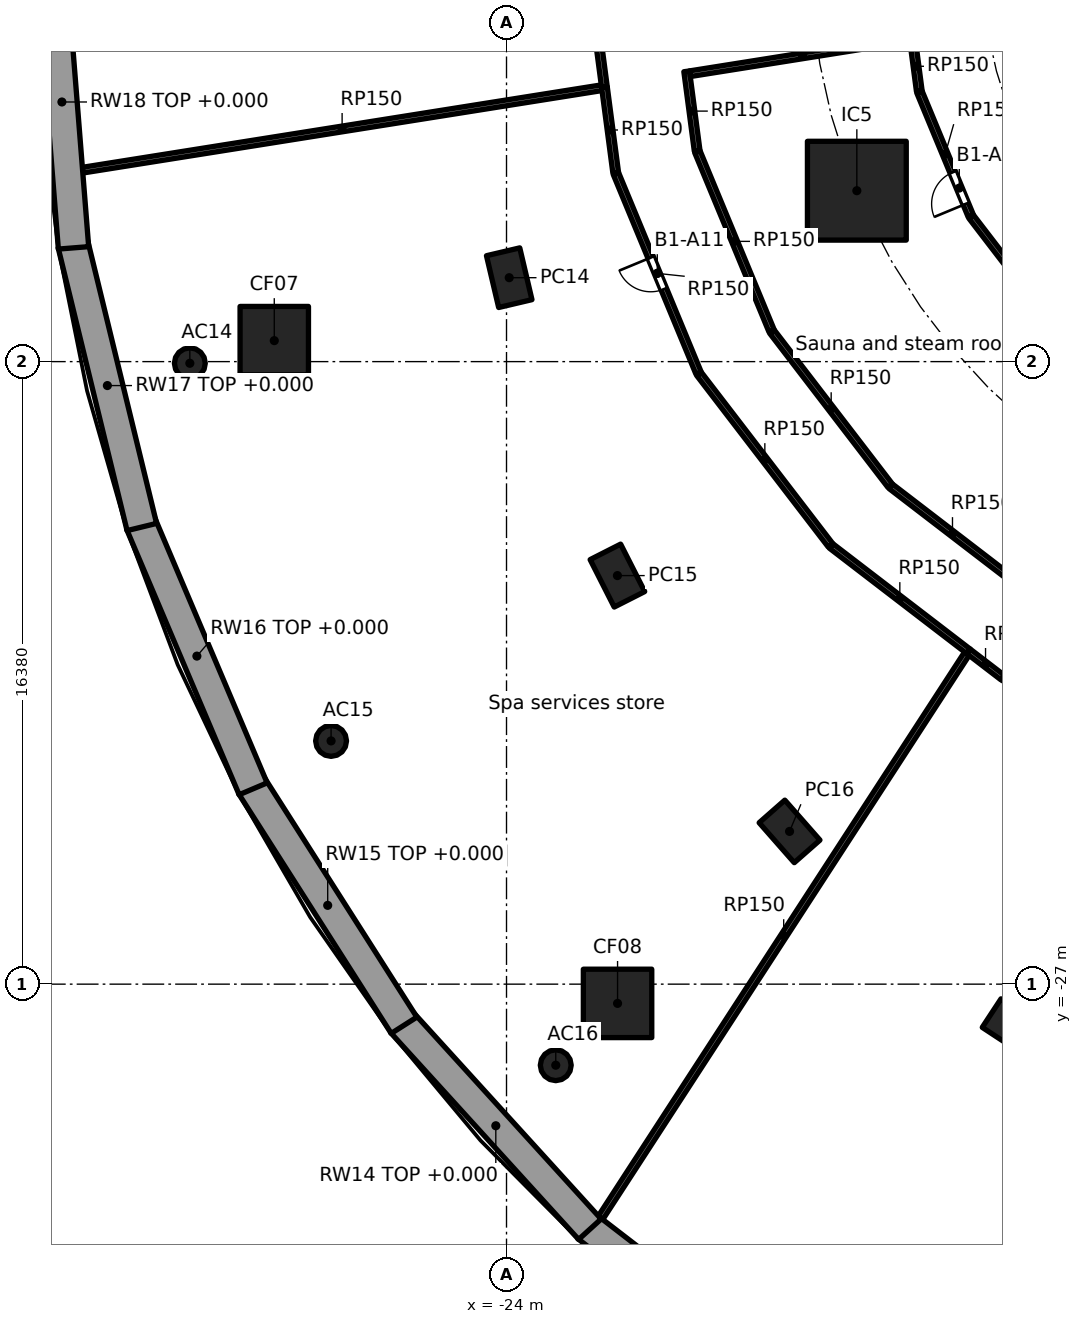
"""IFC4 building model, lengths in metres.
Left out: names, types, materials, properties, quantities, classifications, styles, units other than length and angle.
Written with IfcOpenShell. Run it as: python <this file> out.ifc"""

import sys

from ifc_helpers import new_model, si_unit, direction, frame, frame_2d, origin, origin_2d, place, context, subcontext, project, spatial, rectangle, hollow_rectangle, hollow_circle, extrude, element, fill, save


model = new_model("IFC4")
c1 = context("Model", 3, precision=1e-05, world=origin(), true_north=direction((0.0, 1.0)))
c2 = subcontext(c1, "Body", "Model", "MODEL_VIEW")
j1 = project(units=[si_unit("LENGTHUNIT", "METRE"), si_unit("PLANEANGLEUNIT", "RADIAN")], contexts=[c1])
p1 = place(None, origin())
s1 = spatial("IfcSite", under=j1, at=p1, CompositionType="ELEMENT")
p2 = place(p1, origin())
s2 = spatial("IfcBuilding", under=s1, at=p2, CompositionType="ELEMENT")
p3 = place(p2, frame((0.0, 0.0, -5.0)))
s3 = spatial("IfcBuildingStorey", under=s2, at=p3, CompositionType="ELEMENT", Elevation=-5.0)
p4 = place(p3, frame((-16.146, -37.798, 0.0), z_axis=(0.0, 0.0, 1.0), x_axis=(-0.792235092298, 0.610215993343, 0.0)))
e1 = element("IfcWall", 1, at=p4, inside=s3, PredefinedType="SOLIDWALL", context=c2, shape_type="SweptSolid", body=[
    extrude(rectangle(XDim=7.238, YDim=0.8, at=frame_2d((3.619, 0.0))), origin(), (0.0, 0.0, 1.0), 5.0),
])
p5 = place(p3, frame((-21.806, -33.449, 0.0), z_axis=(0.0, 0.0, 1.0), x_axis=(-0.672652980875, 0.73995808484, 0.0)))
e2 = element("IfcWall", 2, at=p5, inside=s3, PredefinedType="SOLIDWALL", context=c2, shape_type="SweptSolid", body=[
    extrude(rectangle(XDim=7.36, YDim=0.8, at=frame_2d((3.68, 0.0))), origin(), (0.0, 0.0, 1.0), 5.0),
])
p6 = place(p3, frame((-26.697, -28.082, 0.0), z_axis=(0.0, 0.0, 1.0), x_axis=(-0.53698952756, 0.843588908943, 0.0)))
e3 = element("IfcWall", 3, at=p6, inside=s3, PredefinedType="SOLIDWALL", context=c2, shape_type="SweptSolid", body=[
    extrude(rectangle(XDim=7.48, YDim=0.8, at=frame_2d((3.74, 0.0))), origin(), (0.0, 0.0, 1.0), 5.0),
])
p7 = place(p3, frame((-30.667, -21.86, 0.0), z_axis=(0.0, 0.0, 1.0), x_axis=(-0.390299354435, 0.920688011179, 0.0)))
e4 = element("IfcWall", 4, at=p7, inside=s3, PredefinedType="SOLIDWALL", context=c2, shape_type="SweptSolid", body=[
    extrude(rectangle(XDim=7.584, YDim=0.8, at=frame_2d((3.792, 0.0))), origin(), (0.0, 0.0, 1.0), 5.0),
])
p8 = place(p3, frame((-33.596, -14.972, 0.0), z_axis=(0.0, 0.0, 1.0), x_axis=(-0.23668985803, 0.971585256735, 0.0)))
e5 = element("IfcWall", 5, at=p8, inside=s3, PredefinedType="SOLIDWALL", context=c2, shape_type="SweptSolid", body=[
    extrude(rectangle(XDim=7.661, YDim=0.8, at=frame_2d((3.831, 0.0))), origin(), (0.0, 0.0, 1.0), 5.0),
])
p9 = place(p3, frame((-35.393, -7.627, 0.0), z_axis=(0.0, 0.0, 1.0), x_axis=(-0.079287821658, 0.996851764977, 0.0)))
e6 = element("IfcWall", 6, at=p9, inside=s3, PredefinedType="SOLIDWALL", context=c2, shape_type="SweptSolid", body=[
    extrude(rectangle(XDim=7.701, YDim=0.8, at=frame_2d((3.851, 0.0))), origin(), (0.0, 0.0, 1.0), 5.0),
])
for number, where, z_axis, x_axis in (
    (7, (-23.929, -8.412, 0.0), (0.0, 0.0, 1.0), (0.229, -0.973, 0.0)),
    (8, (-21.082, -16.25, 0.0), (0.0, 0.0, 1.0), (0.452, -0.892, 0.0)),
    (9, (-16.552, -22.981, 0.0), (0.0, 0.0, 1.0), (0.66, -0.751, 0.0)),
    (10, (-10.65, -28.146, 0.0), (0.0, 0.0, 1.0), (0.836, -0.549, 0.0)),
):
    element("IfcColumn", number, at=place(p3, frame(where, z_axis=z_axis, x_axis=x_axis)), inside=s3, PredefinedType="COLUMN", context=c2, shape_type="SweptSolid", body=[
        extrude(hollow_rectangle(XDim=1.4, YDim=0.9, WallThickness=0.05, at=origin_2d()), origin(), (0.0, 0.0, 1.0), 5.0),
    ])
p10 = place(p3, frame((-14.782, -6.123, 0.0), z_axis=(0.0, 0.0, 1.0), x_axis=(1.0, 0.0, 0.0)))
e11 = element("IfcColumn", 11, at=p10, inside=s3, PredefinedType="COLUMN", context=c2, shape_type="SweptSolid", body=[
    extrude(rectangle(XDim=2.6, YDim=2.6, at=origin_2d()), origin(), (0.0, 0.0, 1.0), 5.0),
])
for number, where, z_axis, x_axis in (
    (12, (-32.333, -10.663, 0.0), (0.0, 0.0, 1.0), (1.0, 0.0, 0.0)),
    (13, (-28.616, -20.6, 0.0), (0.0, 0.0, 1.0), (1.0, 0.0, 0.0)),
    (14, (-22.704, -29.133, 0.0), (0.0, 0.0, 1.0), (1.0, 0.0, 0.0)),
):
    element("IfcColumn", number, at=place(p3, frame(where, z_axis=z_axis, x_axis=x_axis)), inside=s3, PredefinedType="COLUMN", context=c2, shape_type="SweptSolid", body=[
        extrude(hollow_circle(Radius=0.406, WallThickness=0.025, at=origin_2d()), origin(), (0.0, 0.0, 1.0), 5.0),
    ])
for number, where, z_axis, x_axis in (
    (15, (-30.111, -10.068, 0.0), (0.0, 0.0, 1.0), (1.0, 0.0, 0.0)),
    (16, (-21.078, -27.506, 0.0), (0.0, 0.0, 1.0), (1.0, 0.0, 0.0)),
):
    element("IfcColumn", number, at=place(p3, frame(where, z_axis=z_axis, x_axis=x_axis)), inside=s3, PredefinedType="COLUMN", context=c2, shape_type="SweptSolid", body=[
        extrude(rectangle(XDim=1.8, YDim=1.8, at=origin_2d()), origin(), (0.0, 0.0, 1.0), 5.0),
    ])
p11 = place(p3, frame((-21.497, -3.414, 0.0), z_axis=(0.0, 0.0, 1.0), x_axis=(-0.987622855612, -0.156847362339, 0.0)))
e17 = element("IfcWall", 17, at=p11, inside=s3, PredefinedType="PARTITIONING", context=c2, shape_type="SweptSolid", body=[
    extrude(rectangle(XDim=13.828, YDim=0.15, at=frame_2d((6.914, 0.0))), origin(), (0.0, 0.0, 1.0), 4.6),
])
p12 = place(p3, frame((-21.423, -3.402, 0.0), z_axis=(0.0, 0.0, 1.0), x_axis=(-0.130508069965, 0.991447247045, 0.0)))
e18 = element("IfcWall", 18, at=p12, inside=s3, PredefinedType="PARTITIONING", context=c2, shape_type="SweptSolid", body=[
    extrude(rectangle(XDim=3.42, YDim=0.15, at=frame_2d((1.71, 0.0))), origin(), (0.0, 0.0, 1.0), 4.6),
])
p13 = place(p3, frame((-21.127, -5.649, 0.0), z_axis=(0.0, 0.0, 1.0), x_axis=(-0.130568768581, 0.991439255159, 0.0)))
e19 = element("IfcWall", 19, at=p13, inside=s3, PredefinedType="PARTITIONING", context=c2, shape_type="SweptSolid", body=[
    extrude(rectangle(XDim=2.266, YDim=0.15, at=frame_2d((1.133, 0.0))), origin(), (0.0, 0.0, 1.0), 4.6),
])
p14 = place(p3, frame((-19.259, -2.982, 0.0), z_axis=(0.0, 0.0, 1.0), x_axis=(0.130625106848, -0.991431833996, 0.0)))
e20 = element("IfcWall", 20, at=p14, inside=s3, PredefinedType="PARTITIONING", context=c2, shape_type="SweptSolid", body=[
    extrude(rectangle(XDim=2.11, YDim=0.15, at=frame_2d((1.055, 0.0))), origin(), (0.0, 0.0, 1.0), 4.6),
])
p15 = place(p3, frame((-18.978, -5.097, 0.0), z_axis=(0.0, 0.0, 1.0), x_axis=(0.382672704618, -0.923883976017, 0.0)))
e21 = element("IfcWall", 21, at=p15, inside=s3, PredefinedType="PARTITIONING", context=c2, shape_type="SweptSolid", body=[
    extrude(rectangle(XDim=5.106, YDim=0.15, at=frame_2d((2.553, 0.0))), origin(), (0.0, 0.0, 1.0), 4.6),
])
p16 = place(p3, frame((-18.945, -10.924, 0.0), z_axis=(0.0, 0.0, 1.0), x_axis=(-0.38269058712, 0.923876568882, 0.0)))
e22 = element("IfcWall", 22, at=p16, inside=s3, PredefinedType="PARTITIONING", context=c2, shape_type="SweptSolid", body=[
    extrude(rectangle(XDim=5.686, YDim=0.15, at=frame_2d((2.843, 0.0))), origin(), (0.0, 0.0, 1.0), 4.6),
])
p17 = place(p16, frame((2.393, 0.0, 0.0)))
e23 = element("IfcOpeningElement", 23, at=p17, cuts=e22, PredefinedType="OPENING", context=c2, shape_type="SweptSolid", body=[
    extrude(rectangle(XDim=0.9, YDim=2.1, at=frame_2d((0.45, 1.05))), frame((0.0, 0.085, 0.0), z_axis=(0.0, -1.0, 0.0), x_axis=(1.0, 0.0, 0.0)), (0.0, 0.0, 1.0), 0.17),
])
p18 = place(p3, frame((-17.012, -9.835, 0.0), z_axis=(0.0, 0.0, 1.0), x_axis=(0.608760705644, -0.793353895348, 0.0)))
e24 = element("IfcWall", 24, at=p18, inside=s3, PredefinedType="PARTITIONING", context=c2, shape_type="SweptSolid", body=[
    extrude(rectangle(XDim=5.106, YDim=0.15, at=frame_2d((2.553, 0.0))), origin(), (0.0, 0.0, 1.0), 4.6),
])
p19 = place(p3, frame((-15.472, -15.456, 0.0), z_axis=(0.0, 0.0, 1.0), x_axis=(-0.608757822828, 0.793356107398, 0.0)))
e25 = element("IfcWall", 25, at=p19, inside=s3, PredefinedType="PARTITIONING", context=c2, shape_type="SweptSolid", body=[
    extrude(rectangle(XDim=5.686, YDim=0.15, at=frame_2d((2.843, 0.0))), origin(), (0.0, 0.0, 1.0), 4.6),
])
p20 = place(p3, frame((-13.886, -13.903, 0.0), z_axis=(0.0, 0.0, 1.0), x_axis=(0.793356294792, -0.608757578609, 0.0)))
e26 = element("IfcWall", 26, at=p20, inside=s3, PredefinedType="PARTITIONING", context=c2, shape_type="SweptSolid", body=[
    extrude(rectangle(XDim=4.087, YDim=0.15, at=frame_2d((2.043, 0.0))), origin(), (0.0, 0.0, 1.0), 4.6),
])
p21 = place(p3, frame((-13.247, -2.104, 0.0), z_axis=(0.0, 0.0, 1.0), x_axis=(-0.98762373009, -0.156841855905, 0.0)))
e27 = element("IfcWall", 27, at=p21, inside=s3, PredefinedType="PARTITIONING", context=c2, shape_type="SweptSolid", body=[
    extrude(rectangle(XDim=6.002, YDim=0.15, at=frame_2d((3.001, 0.0))), origin(), (0.0, 0.0, 1.0), 4.6),
])
p22 = place(p3, frame((-13.138, -3.508, 0.0), z_axis=(0.0, 0.0, 1.0), x_axis=(-0.130563767128, 0.991439913819, 0.0)))
e28 = element("IfcWall", 28, at=p22, inside=s3, PredefinedType="PARTITIONING", context=c2, shape_type="SweptSolid", body=[
    extrude(rectangle(XDim=1.33, YDim=0.15, at=frame_2d((0.665, 0.0))), origin(), (0.0, 0.0, 1.0), 4.6),
])
p23 = place(p3, frame((-11.887, -18.305, 0.0), z_axis=(0.0, 0.0, 1.0), x_axis=(-0.544635811305, -0.838672661438, 0.0)))
e29 = element("IfcWall", 29, at=p23, inside=s3, PredefinedType="PARTITIONING", context=c2, shape_type="SweptSolid", body=[
    extrude(rectangle(XDim=17.699, YDim=0.15, at=frame_2d((8.849, 0.0))), origin(), (0.0, 0.0, 1.0), 4.6),
])
p24 = place(p3, frame((-11.846, -18.242, 0.0), z_axis=(0.0, 0.0, 1.0), x_axis=(-0.793357543816, 0.608755950829, 0.0)))
e30 = element("IfcWall", 30, at=p24, inside=s3, PredefinedType="PARTITIONING", context=c2, shape_type="SweptSolid", body=[
    extrude(rectangle(XDim=4.55, YDim=0.15, at=frame_2d((2.275, 0.0))), origin(), (0.0, 0.0, 1.0), 4.6),
])
p25 = place(p3, frame((-11.782, -6.789, 0.0), z_axis=(0.0, 0.0, 1.0), x_axis=(-0.382677866108, 0.923881838111, 0.0)))
e31 = element("IfcWall", 31, at=p25, inside=s3, PredefinedType="PARTITIONING", context=c2, shape_type="SweptSolid", body=[
    extrude(rectangle(XDim=3.527, YDim=0.15, at=frame_2d((1.763, 0.0))), origin(), (0.0, 0.0, 1.0), 4.6),
])
p26 = place(p25, frame((0.346, 0.0, 0.0)))
e32 = element("IfcOpeningElement", 32, at=p26, cuts=e31, PredefinedType="OPENING", context=c2, shape_type="SweptSolid", body=[
    extrude(rectangle(XDim=0.9, YDim=2.1, at=frame_2d((0.45, 1.05))), frame((0.0, 0.085, 0.0), z_axis=(0.0, -1.0, 0.0), x_axis=(1.0, 0.0, 0.0)), (0.0, 0.0, 1.0), 0.17),
])
p27 = place(p3, frame((-10.945, -18.933, 0.0), z_axis=(0.0, 0.0, 1.0), x_axis=(-0.793350355506, 0.608765318837, 0.0)))
e33 = element("IfcWall", 33, at=p27, inside=s3, PredefinedType="PARTITIONING", context=c2, shape_type="SweptSolid", body=[
    extrude(rectangle(XDim=1.136, YDim=0.15, at=frame_2d((0.568, 0.0))), origin(), (0.0, 0.0, 1.0), 4.6),
])
p28 = place(p3, frame((-9.624, -9.607, 0.0), z_axis=(0.0, 0.0, 1.0), x_axis=(-0.608736710054, 0.793372307201, 0.0)))
e34 = element("IfcWall", 34, at=p28, inside=s3, PredefinedType="PARTITIONING", context=c2, shape_type="SweptSolid", body=[
    extrude(rectangle(XDim=3.527, YDim=0.15, at=frame_2d((1.763, 0.0))), origin(), (0.0, 0.0, 1.0), 4.6),
])
p29 = place(p3, frame((-5.672, -21.121, 0.0), z_axis=(0.0, 0.0, 1.0), x_axis=(-0.923876568882, 0.38269058712, 0.0)))
e35 = element("IfcWall", 35, at=p29, inside=s3, PredefinedType="PARTITIONING", context=c2, shape_type="SweptSolid", body=[
    extrude(rectangle(XDim=5.686, YDim=0.15, at=frame_2d((2.843, 0.0))), origin(), (0.0, 0.0, 1.0), 4.6),
])
p30 = place(p26, origin())
e36 = element("IfcDoor", 36, at=p30, inside=s3, OperationType="SINGLE_SWING_LEFT", PredefinedType="DOOR", context=c2, shape_type="SweptSolid", body=[
    extrude(rectangle(XDim=0.9, YDim=2.1, at=frame_2d((0.45, 1.05))), frame((0.0, 0.025, 0.0), z_axis=(0.0, -1.0, 0.0), x_axis=(1.0, 0.0, 0.0)), (0.0, 0.0, 1.0), 0.05),
])
fill(e32, e36)
p31 = place(p17, origin())
e37 = element("IfcDoor", 37, at=p31, inside=s3, OperationType="SINGLE_SWING_RIGHT", PredefinedType="DOOR", context=c2, shape_type="SweptSolid", body=[
    extrude(rectangle(XDim=0.9, YDim=2.1, at=frame_2d((0.45, 1.05))), frame((0.0, 0.025, 0.0), z_axis=(0.0, -1.0, 0.0), x_axis=(1.0, 0.0, 0.0)), (0.0, 0.0, 1.0), 0.05),
])
fill(e23, e37)
save(model, sys.argv[1])
